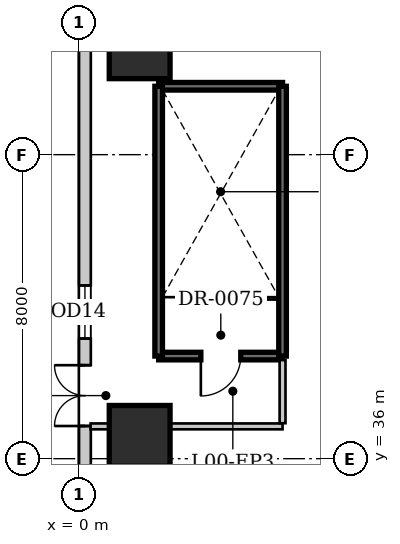
"""IFC4 building model, lengths in metres.
Left out: names, types, materials, properties, quantities, classifications, styles, units other than length and angle.
Written with IfcOpenShell. Run it as: python <this file> out.ifc"""

import sys

from ifc_helpers import new_model, si_unit, direction, frame, frame_2d, origin, origin_2d, place, context, subcontext, project, spatial, rectangle, extrude, source, transform, mapped, element, fill, save


model = new_model("IFC4")
c1 = context("Model", 3, precision=1e-05, world=origin(), true_north=direction((0.0, 1.0)))
c2 = subcontext(c1, "Body", "Model", "MODEL_VIEW")
j1 = project(units=[si_unit("LENGTHUNIT", "METRE"), si_unit("PLANEANGLEUNIT", "RADIAN")], contexts=[c1])
p1 = place(None, origin())
s1 = spatial("IfcSite", under=j1, at=p1, CompositionType="ELEMENT")
p2 = place(p1, origin())
s2 = spatial("IfcBuilding", under=s1, at=p2, CompositionType="ELEMENT")
p3 = place(p2, origin())
s3 = spatial("IfcBuildingStorey", under=s2, at=p3, CompositionType="ELEMENT", Elevation=0.0)
for number, where, z_axis, x_axis in (
    (1, (1.6, 36.6, 0.0), (0.0, 0.0, 1.0), (1.0, 0.0, 0.0)),
    (2, (1.6, 46.8, 0.0), (0.0, 0.0, 1.0), (1.0, 0.0, 0.0)),
):
    element("IfcColumn", number, at=place(p3, frame(where, z_axis=z_axis, x_axis=x_axis)), inside=s3, PredefinedType="COLUMN", context=c2, shape_type="SweptSolid", body=[
        extrude(rectangle(XDim=1.6, YDim=1.6, at=origin_2d()), origin(), (0.0, 0.0, 1.0), 4.9),
    ])
p4 = place(p3, frame((0.16, 8.16, 0.0), z_axis=(0.0, 0.0, 1.0), x_axis=(0.0, 1.0, 0.0)))
e3 = element("IfcWall", 3, at=p4, inside=s3, PredefinedType="SOLIDWALL", context=c2, shape_type="SweptSolid", body=[
    extrude(rectangle(XDim=39.68, YDim=0.31, at=frame_2d((19.84, 0.0))), origin(), (0.0, 0.0, 1.0), 4.65),
])
p5 = place(p4, frame((5.0, 0.0, 0.95)))
e4 = element("IfcOpeningElement", 4, at=p5, cuts=e3, PredefinedType="OPENING", context=c2, shape_type="SweptSolid", body=[
    extrude(rectangle(XDim=1.4, YDim=2.2, at=frame_2d((0.7, 1.1))), frame((0.0, 0.165, 0.0), z_axis=(0.0, -1.0, 0.0), x_axis=(1.0, 0.0, 0.0)), (0.0, 0.0, 1.0), 0.33),
])
p6 = place(p4, frame((11.35, 0.0, 0.95)))
e5 = element("IfcOpeningElement", 5, at=p6, cuts=e3, PredefinedType="OPENING", context=c2, shape_type="SweptSolid", body=[
    extrude(rectangle(XDim=1.4, YDim=2.2, at=frame_2d((0.7, 1.1))), frame((0.0, 0.165, 0.0), z_axis=(0.0, -1.0, 0.0), x_axis=(1.0, 0.0, 0.0)), (0.0, 0.0, 1.0), 0.33),
])
p7 = place(p4, frame((22.0, 0.0, 0.95)))
e6 = element("IfcOpeningElement", 6, at=p7, cuts=e3, PredefinedType="OPENING", context=c2, shape_type="SweptSolid", body=[
    extrude(rectangle(XDim=1.4, YDim=2.2, at=frame_2d((0.7, 1.1))), frame((0.0, 0.165, 0.0), z_axis=(0.0, -1.0, 0.0), x_axis=(1.0, 0.0, 0.0)), (0.0, 0.0, 1.0), 0.33),
])
p8 = place(p4, frame((31.0, 0.0, 0.95)))
e7 = element("IfcOpeningElement", 7, at=p8, cuts=e3, PredefinedType="OPENING", context=c2, shape_type="SweptSolid", body=[
    extrude(rectangle(XDim=1.4, YDim=2.2, at=frame_2d((0.7, 1.1))), frame((0.0, 0.165, 0.0), z_axis=(0.0, -1.0, 0.0), x_axis=(1.0, 0.0, 0.0)), (0.0, 0.0, 1.0), 0.33),
])
p9 = place(p4, frame((28.7, 0.0, 0.0)))
e8 = element("IfcOpeningElement", 8, at=p9, cuts=e3, PredefinedType="OPENING", context=c2, shape_type="SweptSolid", body=[
    extrude(rectangle(XDim=1.6, YDim=2.35, at=frame_2d((0.8, 1.175))), frame((0.0, 0.165, 0.0), z_axis=(0.0, -1.0, 0.0), x_axis=(1.0, 0.0, 0.0)), (0.0, 0.0, 1.0), 0.33),
])
p10 = place(p3, frame((5.36, 38.7, 0.0), z_axis=(0.0, 0.0, 1.0), x_axis=(-1.0, 0.0, 0.0)))
e9 = element("IfcWall", 9, at=p10, inside=s3, PredefinedType="SHEAR", context=c2, shape_type="SweptSolid", body=[
    extrude(rectangle(XDim=3.26, YDim=0.2, at=frame_2d((1.63, 0.0))), origin(), (0.0, 0.0, 1.0), 5.2),
])
p11 = place(p10, frame((1.1, 0.0, 0.0)))
e10 = element("IfcOpeningElement", 10, at=p11, cuts=e9, PredefinedType="OPENING", context=c2, shape_type="SweptSolid", body=[
    extrude(rectangle(XDim=1.05, YDim=2.15, at=frame_2d((0.525, 1.075))), frame((0.0, 0.11, 0.0), z_axis=(0.0, -1.0, 0.0), x_axis=(1.0, 0.0, 0.0)), (0.0, 0.0, 1.0), 0.22),
])
p12 = place(p3, frame((2.1, 45.8, 0.0), z_axis=(0.0, 0.0, 1.0), x_axis=(1.0, 0.0, 0.0)))
e11 = element("IfcWall", 11, at=p12, inside=s3, PredefinedType="SHEAR", context=c2, shape_type="SweptSolid", body=[
    extrude(rectangle(XDim=3.26, YDim=0.2, at=frame_2d((1.63, 0.0))), origin(), (0.0, 0.0, 1.0), 5.2),
])
for number, where, z_axis, x_axis in (
    (12, (2.1, 38.7, 0.0), (0.0, 0.0, 1.0), (0.0, 1.0, 0.0)),
    (13, (5.36, 38.7, 0.0), (0.0, 0.0, 1.0), (0.0, 1.0, 0.0)),
):
    element("IfcWall", number, at=place(p3, frame(where, z_axis=z_axis, x_axis=x_axis)), inside=s3, PredefinedType="SHEAR", context=c2, shape_type="SweptSolid", body=[
        extrude(rectangle(XDim=7.1, YDim=0.2, at=frame_2d((3.55, 0.0))), origin(), (0.0, 0.0, 1.0), 5.2),
    ])
p13 = place(p3, frame((0.31, 36.85, 0.0), z_axis=(0.0, 0.0, 1.0), x_axis=(1.0, 0.0, 0.0)))
e14 = element("IfcWall", 14, at=p13, inside=s3, PredefinedType="PARTITIONING", context=c2, shape_type="SweptSolid", body=[
    extrude(rectangle(XDim=5.05, YDim=0.155, at=frame_2d((2.525, 0.0))), origin(), (0.0, 0.0, 1.0), 4.02),
])
p14 = place(p3, frame((5.36, 36.934, 0.0), z_axis=(0.0, 0.0, 1.0), x_axis=(0.0, 1.0, 0.0)))
e15 = element("IfcWall", 15, at=p14, inside=s3, PredefinedType="PARTITIONING", context=c2, shape_type="SweptSolid", body=[
    extrude(rectangle(XDim=1.66, YDim=0.155, at=frame_2d((0.83, 0.0))), origin(), (0.0, 0.0, 1.0), 4.9),
])
m1 = source(origin(), c2, "Body", "SweptSolid", [
    extrude(rectangle(XDim=1.4, YDim=2.2, at=frame_2d((0.7, 1.1))), frame((0.0, 0.03, 0.0), z_axis=(0.0, -1.0, 0.0), x_axis=(1.0, 0.0, 0.0)), (0.0, 0.0, 1.0), 0.06),
])
p15 = place(p8, origin())
e16 = element("IfcWindow", 16, at=p15, inside=s3, PartitioningType="SINGLE_PANEL", PredefinedType="WINDOW", context=c2, shape_type="MappedRepresentation", body=[
    mapped(m1, transform((0.0, 0.0, 0.0), x_axis=(1.0, 0.0, 0.0), y_axis=(0.0, 1.0, 0.0), z_axis=(0.0, 0.0, 1.0), scale=1.0)),
])
fill(e7, e16)
m2 = source(origin(), c2, "Body", "SweptSolid", [
    extrude(rectangle(XDim=1.6, YDim=2.35, at=frame_2d((0.8, 1.175))), frame((0.0, 0.025, 0.0), z_axis=(0.0, -1.0, 0.0), x_axis=(1.0, 0.0, 0.0)), (0.0, 0.0, 1.0), 0.05),
])
p16 = place(p9, origin())
e17 = element("IfcDoor", 17, at=p16, inside=s3, OperationType="DOUBLE_DOOR_SINGLE_SWING", PredefinedType="DOOR", context=c2, shape_type="MappedRepresentation", body=[
    mapped(m2, transform((0.0, 0.0, 0.0), x_axis=(1.0, 0.0, 0.0), y_axis=(0.0, 1.0, 0.0), z_axis=(0.0, 0.0, 1.0), scale=1.0)),
])
fill(e8, e17)
m3 = source(origin(), c2, "Body", "SweptSolid", [
    extrude(rectangle(XDim=1.05, YDim=2.15, at=frame_2d((0.525, 1.075))), frame((0.0, 0.025, 0.0), z_axis=(0.0, -1.0, 0.0), x_axis=(1.0, 0.0, 0.0)), (0.0, 0.0, 1.0), 0.05),
])
p17 = place(p11, origin())
e18 = element("IfcDoor", 18, at=p17, inside=s3, OperationType="SINGLE_SWING_RIGHT", PredefinedType="DOOR", context=c2, shape_type="MappedRepresentation", body=[
    mapped(m3, transform((0.0, 0.0, 0.0), x_axis=(1.0, 0.0, 0.0), y_axis=(0.0, 1.0, 0.0), z_axis=(0.0, 0.0, 1.0), scale=1.0)),
])
fill(e10, e18)
save(model, sys.argv[1])
